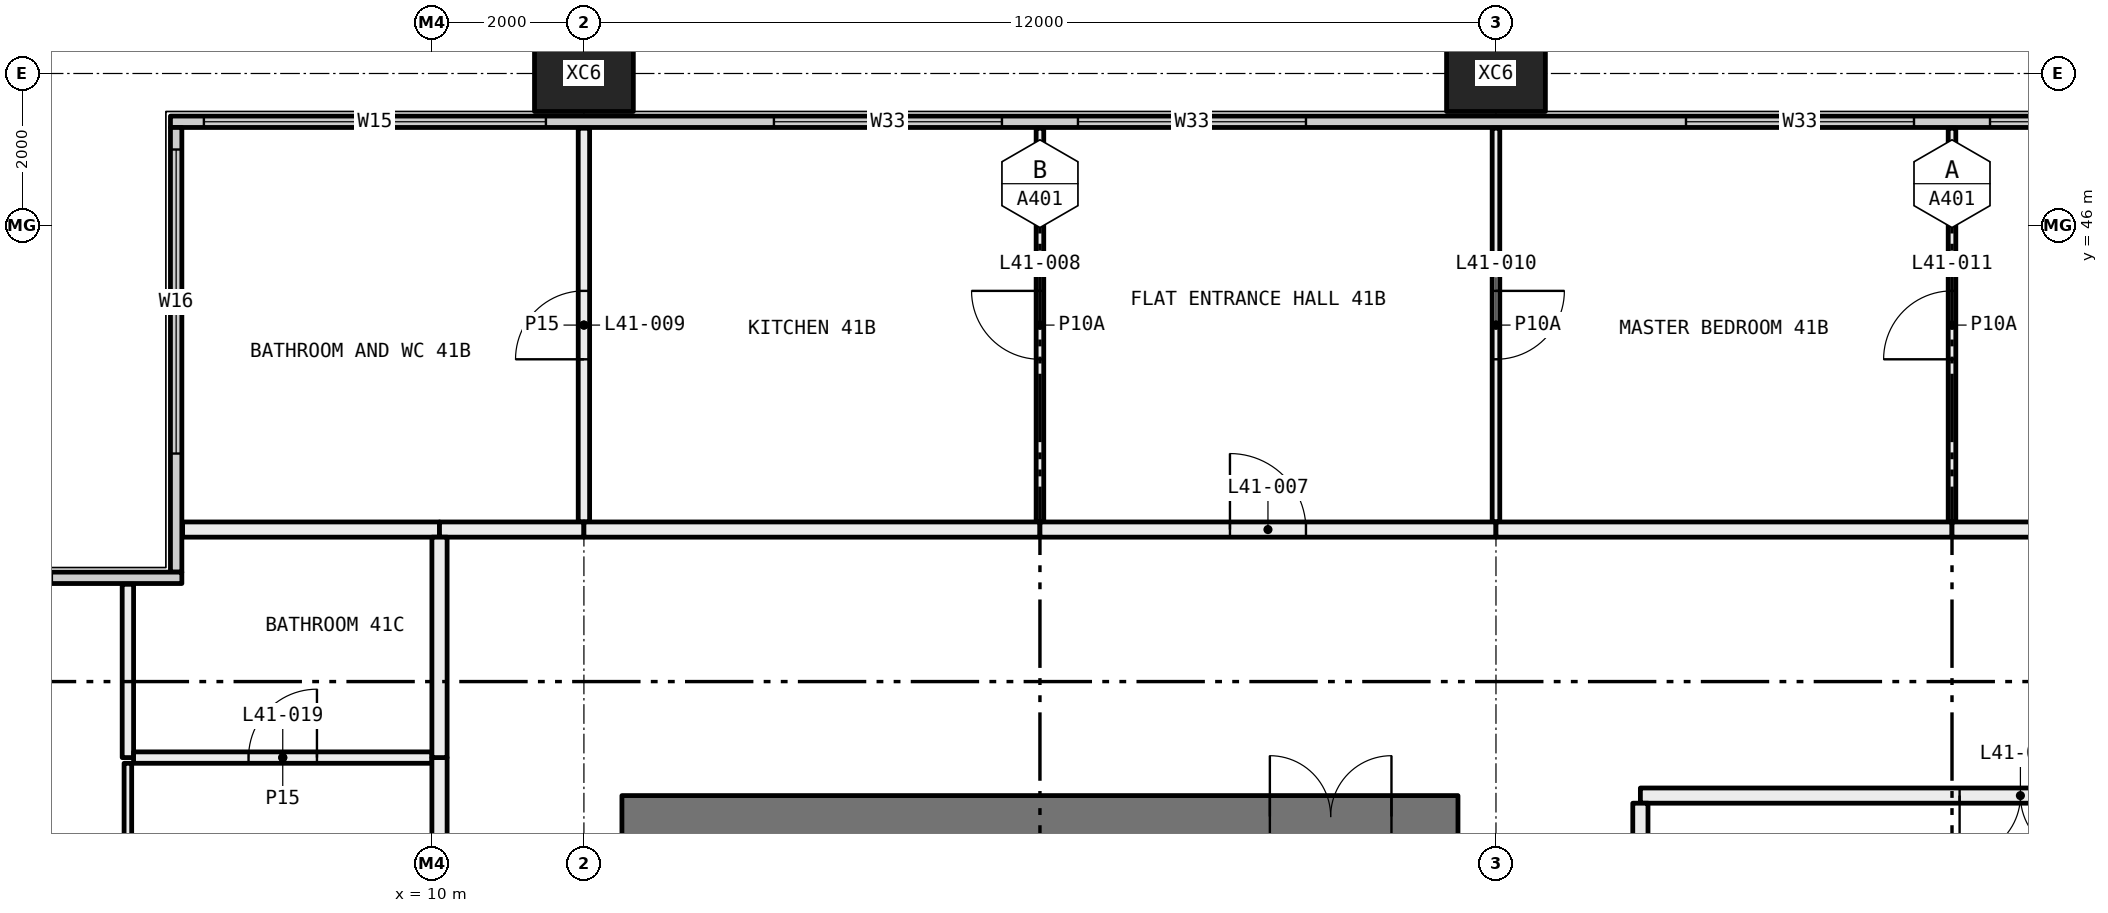
"""IFC4 building model, lengths in metres.
Left out: names, types, materials, properties, quantities, classifications, styles, units other than length and angle.
Written with IfcOpenShell. Run it as: python <this file> out.ifc"""

import sys

from ifc_helpers import new_model, si_unit, direction, frame, frame_2d, origin, origin_2d, place, context, subcontext, project, spatial, rectangle, hollow_rectangle, extrude, element, fill, save


model = new_model("IFC4")
c1 = context("Model", 3, precision=1e-05, world=origin(), true_north=direction((0.0, 1.0)))
c2 = subcontext(c1, "Body", "Model", "MODEL_VIEW")
j1 = project(units=[si_unit("LENGTHUNIT", "METRE"), si_unit("PLANEANGLEUNIT", "RADIAN")], contexts=[c1])
p1 = place(None, origin())
s1 = spatial("IfcSite", under=j1, at=p1, CompositionType="ELEMENT")
p2 = place(p1, origin())
s2 = spatial("IfcBuilding", under=s1, at=p2, CompositionType="ELEMENT")
p3 = place(p2, frame((0.0, 0.0, 158.25)))
s3 = spatial("IfcBuildingStorey", under=s2, at=p3, CompositionType="ELEMENT", Elevation=158.25)
for number, where, z_axis, x_axis in (
    (1, (12.0, 48.0, -0.4), (0.0, 0.0, 1.0), (1.0, 0.0, 0.0)),
    (2, (24.0, 48.0, -0.4), (0.0, 0.0, 1.0), (1.0, 0.0, 0.0)),
):
    element("IfcColumn", number, at=place(p3, frame(where, z_axis=z_axis, x_axis=x_axis)), inside=s3, PredefinedType="COLUMN", context=c2, shape_type="SweptSolid", body=[
        extrude(hollow_rectangle(XDim=1.3, YDim=1.0, WallThickness=0.05, at=origin_2d()), origin(), (0.0, 0.0, 1.0), 3.45),
    ])
p4 = place(p3, frame((6.56, 47.365, 0.0), z_axis=(0.0, 0.0, 1.0), x_axis=(1.0, 0.0, 0.0)))
e3 = element("IfcWall", 3, at=p4, inside=s3, PredefinedType="ELEMENTEDWALL", context=c2, shape_type="SweptSolid", body=[
    extrude(rectangle(XDim=46.88, YDim=0.15, at=frame_2d((23.44, 0.0))), origin(), (0.0, 0.0, 1.0), 3.05),
])
p5 = place(p4, frame((0.44, 0.0, 0.45)))
e4 = element("IfcOpeningElement", 4, at=p5, cuts=e3, PredefinedType="OPENING", context=c2, shape_type="SweptSolid", body=[
    extrude(rectangle(XDim=4.5, YDim=2.55, at=frame_2d((2.25, 1.275))), frame((0.0, 0.085, 0.0), z_axis=(0.0, -1.0, 0.0), x_axis=(1.0, 0.0, 0.0)), (0.0, 0.0, 1.0), 0.17),
])
p6 = place(p4, frame((7.94, 0.0, 0.45)))
e5 = element("IfcOpeningElement", 5, at=p6, cuts=e3, PredefinedType="OPENING", context=c2, shape_type="SweptSolid", body=[
    extrude(rectangle(XDim=3.0, YDim=2.55, at=frame_2d((1.5, 1.275))), frame((0.0, 0.085, 0.0), z_axis=(0.0, -1.0, 0.0), x_axis=(1.0, 0.0, 0.0)), (0.0, 0.0, 1.0), 0.17),
])
p7 = place(p4, frame((11.94, 0.0, 0.45)))
e6 = element("IfcOpeningElement", 6, at=p7, cuts=e3, PredefinedType="OPENING", context=c2, shape_type="SweptSolid", body=[
    extrude(rectangle(XDim=3.0, YDim=2.55, at=frame_2d((1.5, 1.275))), frame((0.0, 0.085, 0.0), z_axis=(0.0, -1.0, 0.0), x_axis=(1.0, 0.0, 0.0)), (0.0, 0.0, 1.0), 0.17),
])
p8 = place(p4, frame((19.94, 0.0, 0.45)))
e7 = element("IfcOpeningElement", 7, at=p8, cuts=e3, PredefinedType="OPENING", context=c2, shape_type="SweptSolid", body=[
    extrude(rectangle(XDim=3.0, YDim=2.55, at=frame_2d((1.5, 1.275))), frame((0.0, 0.085, 0.0), z_axis=(0.0, -1.0, 0.0), x_axis=(1.0, 0.0, 0.0)), (0.0, 0.0, 1.0), 0.17),
])
p9 = place(p4, frame((23.94, 0.0, 0.45)))
e8 = element("IfcOpeningElement", 8, at=p9, cuts=e3, PredefinedType="OPENING", context=c2, shape_type="SweptSolid", body=[
    extrude(rectangle(XDim=2.0, YDim=2.55, at=frame_2d((1.0, 1.275))), frame((0.0, 0.085, 0.0), z_axis=(0.0, -1.0, 0.0), x_axis=(1.0, 0.0, 0.0)), (0.0, 0.0, 1.0), 0.17),
])
p10 = place(p4, frame((31.94, 0.0, 0.45)))
e9 = element("IfcOpeningElement", 9, at=p10, cuts=e3, PredefinedType="OPENING", context=c2, shape_type="SweptSolid", body=[
    extrude(rectangle(XDim=3.0, YDim=2.55, at=frame_2d((1.5, 1.275))), frame((0.0, 0.085, 0.0), z_axis=(0.0, -1.0, 0.0), x_axis=(1.0, 0.0, 0.0)), (0.0, 0.0, 1.0), 0.17),
])
p11 = place(p4, frame((35.94, 0.0, 0.45)))
e10 = element("IfcOpeningElement", 10, at=p11, cuts=e3, PredefinedType="OPENING", context=c2, shape_type="SweptSolid", body=[
    extrude(rectangle(XDim=3.0, YDim=2.55, at=frame_2d((1.5, 1.275))), frame((0.0, 0.085, 0.0), z_axis=(0.0, -1.0, 0.0), x_axis=(1.0, 0.0, 0.0)), (0.0, 0.0, 1.0), 0.17),
])
p12 = place(p4, frame((41.94, 0.0, 0.45)))
e11 = element("IfcOpeningElement", 11, at=p12, cuts=e3, PredefinedType="OPENING", context=c2, shape_type="SweptSolid", body=[
    extrude(rectangle(XDim=4.5, YDim=2.55, at=frame_2d((2.25, 1.275))), frame((0.0, 0.085, 0.0), z_axis=(0.0, -1.0, 0.0), x_axis=(1.0, 0.0, 0.0)), (0.0, 0.0, 1.0), 0.17),
])
p13 = place(p3, frame((6.635, 41.44, 0.0), z_axis=(0.0, 0.0, 1.0), x_axis=(0.0, 1.0, 0.0)))
e12 = element("IfcWall", 12, at=p13, inside=s3, PredefinedType="ELEMENTEDWALL", context=c2, shape_type="SweptSolid", body=[
    extrude(rectangle(XDim=5.85, YDim=0.15, at=frame_2d((2.925, 0.0))), origin(), (0.0, 0.0, 1.0), 3.05),
])
p14 = place(p13, frame((1.56, 0.0, 0.45)))
e13 = element("IfcOpeningElement", 13, at=p14, cuts=e12, PredefinedType="OPENING", context=c2, shape_type="SweptSolid", body=[
    extrude(rectangle(XDim=4.0, YDim=2.55, at=frame_2d((2.0, 1.275))), frame((0.0, 0.085, 0.0), z_axis=(0.0, -1.0, 0.0), x_axis=(1.0, 0.0, 0.0)), (0.0, 0.0, 1.0), 0.17),
])
p15 = place(p3, frame((0.56, 41.365, 0.0), z_axis=(0.0, 0.0, 1.0), x_axis=(1.0, 0.0, 0.0)))
e14 = element("IfcWall", 14, at=p15, inside=s3, PredefinedType="ELEMENTEDWALL", context=c2, shape_type="SweptSolid", body=[
    extrude(rectangle(XDim=6.15, YDim=0.15, at=frame_2d((3.075, 0.0))), origin(), (0.0, 0.0, 1.0), 3.05),
])
p16 = place(p15, frame((0.44, 0.0, 0.45)))
e15 = element("IfcOpeningElement", 15, at=p16, cuts=e14, PredefinedType="OPENING", context=c2, shape_type="SweptSolid", body=[
    extrude(rectangle(XDim=4.0, YDim=2.55, at=frame_2d((2.0, 1.275))), frame((0.0, 0.085, 0.0), z_axis=(0.0, -1.0, 0.0), x_axis=(1.0, 0.0, 0.0)), (0.0, 0.0, 1.0), 0.17),
])
p17 = place(p3, frame((12.0, 42.1, 0.0), z_axis=(0.0, 0.0, 1.0), x_axis=(0.0, 1.0, 0.0)))
e16 = element("IfcWall", 16, at=p17, inside=s3, PredefinedType="PARTITIONING", context=c2, shape_type="SweptSolid", body=[
    extrude(rectangle(XDim=5.18, YDim=0.15, at=frame_2d((2.59, 0.0))), origin(), (0.0, 0.0, 1.0), 3.05),
])
p18 = place(p17, frame((2.14, 0.0, 0.0)))
e17 = element("IfcOpeningElement", 17, at=p18, cuts=e16, PredefinedType="OPENING", context=c2, shape_type="SweptSolid", body=[
    extrude(rectangle(XDim=0.9, YDim=2.1, at=frame_2d((0.45, 1.05))), frame((0.0, 0.085, 0.0), z_axis=(0.0, -1.0, 0.0), x_axis=(1.0, 0.0, 0.0)), (0.0, 0.0, 1.0), 0.17),
])
p19 = place(p3, frame((6.72, 42.0, 0.0), z_axis=(0.0, 0.0, 1.0), x_axis=(1.0, 0.0, 0.0)))
e18 = element("IfcWall", 18, at=p19, inside=s3, PredefinedType="PARTITIONING", context=c2, shape_type="SweptSolid", body=[
    extrude(rectangle(XDim=3.38, YDim=0.2, at=frame_2d((1.69, 0.0))), origin(), (0.0, 0.0, 1.0), 3.05),
])
p20 = place(p3, frame((10.1, 42.0, 0.0), z_axis=(0.0, 0.0, 1.0), x_axis=(1.0, 0.0, 0.0)))
e19 = element("IfcWall", 19, at=p20, inside=s3, PredefinedType="PARTITIONING", context=c2, shape_type="SweptSolid", body=[
    extrude(rectangle(XDim=1.9, YDim=0.2, at=frame_2d((0.95, 0.0))), origin(), (0.0, 0.0, 1.0), 3.05),
])
p21 = place(p3, frame((18.0, 42.1, 0.0), z_axis=(0.0, 0.0, 1.0), x_axis=(0.0, 1.0, 0.0)))
e20 = element("IfcWall", 20, at=p21, inside=s3, PredefinedType="PARTITIONING", context=c2, shape_type="SweptSolid", body=[
    extrude(rectangle(XDim=5.18, YDim=0.1, at=frame_2d((2.59, 0.0))), origin(), (0.0, 0.0, 1.0), 3.05),
])
p22 = place(p21, frame((2.14, 0.0, 0.0)))
e21 = element("IfcOpeningElement", 21, at=p22, cuts=e20, PredefinedType="OPENING", context=c2, shape_type="SweptSolid", body=[
    extrude(rectangle(XDim=0.9, YDim=2.1, at=frame_2d((0.45, 1.05))), frame((0.0, 0.06, 0.0), z_axis=(0.0, -1.0, 0.0), x_axis=(1.0, 0.0, 0.0)), (0.0, 0.0, 1.0), 0.12),
])
p23 = place(p3, frame((12.0, 42.0, 0.0), z_axis=(0.0, 0.0, 1.0), x_axis=(1.0, 0.0, 0.0)))
e22 = element("IfcWall", 22, at=p23, inside=s3, PredefinedType="PARTITIONING", context=c2, shape_type="SweptSolid", body=[
    extrude(rectangle(XDim=6.0, YDim=0.2, at=frame_2d((3.0, 0.0))), origin(), (0.0, 0.0, 1.0), 3.05),
])
p24 = place(p3, frame((24.0, 42.1, 0.0), z_axis=(0.0, 0.0, 1.0), x_axis=(0.0, 1.0, 0.0)))
e23 = element("IfcWall", 23, at=p24, inside=s3, PredefinedType="PARTITIONING", context=c2, shape_type="SweptSolid", body=[
    extrude(rectangle(XDim=5.18, YDim=0.1, at=frame_2d((2.59, 0.0))), origin(), (0.0, 0.0, 1.0), 3.05),
])
p25 = place(p24, frame((2.14, 0.0, 0.0)))
e24 = element("IfcOpeningElement", 24, at=p25, cuts=e23, PredefinedType="OPENING", context=c2, shape_type="SweptSolid", body=[
    extrude(rectangle(XDim=0.9, YDim=2.1, at=frame_2d((0.45, 1.05))), frame((0.0, 0.06, 0.0), z_axis=(0.0, -1.0, 0.0), x_axis=(1.0, 0.0, 0.0)), (0.0, 0.0, 1.0), 0.12),
])
p26 = place(p3, frame((18.0, 42.0, 0.0), z_axis=(0.0, 0.0, 1.0), x_axis=(1.0, 0.0, 0.0)))
e25 = element("IfcWall", 25, at=p26, inside=s3, PredefinedType="PARTITIONING", context=c2, shape_type="SweptSolid", body=[
    extrude(rectangle(XDim=6.0, YDim=0.2, at=frame_2d((3.0, 0.0))), origin(), (0.0, 0.0, 1.0), 3.05),
])
p27 = place(p26, frame((2.5, 0.0, 0.0)))
e26 = element("IfcOpeningElement", 26, at=p27, cuts=e25, PredefinedType="OPENING", context=c2, shape_type="SweptSolid", body=[
    extrude(rectangle(XDim=1.0, YDim=2.1, at=frame_2d((0.5, 1.05))), frame((0.0, 0.11, 0.0), z_axis=(0.0, -1.0, 0.0), x_axis=(1.0, 0.0, 0.0)), (0.0, 0.0, 1.0), 0.22),
])
p28 = place(p3, frame((30.0, 42.1, 0.0), z_axis=(0.0, 0.0, 1.0), x_axis=(0.0, 1.0, 0.0)))
e27 = element("IfcWall", 27, at=p28, inside=s3, PredefinedType="PARTITIONING", context=c2, shape_type="SweptSolid", body=[
    extrude(rectangle(XDim=5.18, YDim=0.1, at=frame_2d((2.59, 0.0))), origin(), (0.0, 0.0, 1.0), 3.05),
])
p29 = place(p28, frame((2.14, 0.0, 0.0)))
e28 = element("IfcOpeningElement", 28, at=p29, cuts=e27, PredefinedType="OPENING", context=c2, shape_type="SweptSolid", body=[
    extrude(rectangle(XDim=0.9, YDim=2.1, at=frame_2d((0.45, 1.05))), frame((0.0, 0.06, 0.0), z_axis=(0.0, -1.0, 0.0), x_axis=(1.0, 0.0, 0.0)), (0.0, 0.0, 1.0), 0.12),
])
p30 = place(p3, frame((24.0, 42.0, 0.0), z_axis=(0.0, 0.0, 1.0), x_axis=(1.0, 0.0, 0.0)))
e29 = element("IfcWall", 29, at=p30, inside=s3, PredefinedType="PARTITIONING", context=c2, shape_type="SweptSolid", body=[
    extrude(rectangle(XDim=6.0, YDim=0.2, at=frame_2d((3.0, 0.0))), origin(), (0.0, 0.0, 1.0), 3.05),
])
p31 = place(p3, frame((30.0, 42.0, 0.0), z_axis=(0.0, 0.0, 1.0), x_axis=(1.0, 0.0, 0.0)))
e30 = element("IfcWall", 30, at=p31, inside=s3, PredefinedType="PARTITIONING", context=c2, shape_type="SweptSolid", body=[
    extrude(rectangle(XDim=5.9, YDim=0.2, at=frame_2d((2.95, 0.0))), origin(), (0.0, 0.0, 1.0), 3.05),
])
p32 = place(p3, frame((6.0, 36.1, 0.0), z_axis=(0.0, 0.0, 1.0), x_axis=(0.0, 1.0, 0.0)))
e31 = element("IfcWall", 31, at=p32, inside=s3, PredefinedType="PARTITIONING", context=c2, shape_type="SweptSolid", body=[
    extrude(rectangle(XDim=2.825, YDim=0.1, at=frame_2d((1.413, 0.0))), origin(), (0.0, 0.0, 1.0), 3.05),
])
p33 = place(p3, frame((6.0, 39.0, 0.0), z_axis=(0.0, 0.0, 1.0), x_axis=(0.0, 1.0, 0.0)))
e32 = element("IfcWall", 32, at=p33, inside=s3, PredefinedType="PARTITIONING", context=c2, shape_type="SweptSolid", body=[
    extrude(rectangle(XDim=2.28, YDim=0.15, at=frame_2d((1.14, 0.0))), origin(), (0.0, 0.0, 1.0), 3.05),
])
p34 = place(p3, frame((10.0, 39.0, 0.0), z_axis=(0.0, 0.0, 1.0), x_axis=(-1.0, 0.0, 0.0)))
e33 = element("IfcWall", 33, at=p34, inside=s3, PredefinedType="PARTITIONING", context=c2, shape_type="SweptSolid", body=[
    extrude(rectangle(XDim=3.925, YDim=0.15, at=frame_2d((1.962, 0.0))), origin(), (0.0, 0.0, 1.0), 3.05),
])
p35 = place(p34, frame((1.512, 0.0, 0.0)))
e34 = element("IfcOpeningElement", 34, at=p35, cuts=e33, PredefinedType="OPENING", context=c2, shape_type="SweptSolid", body=[
    extrude(rectangle(XDim=0.9, YDim=2.1, at=frame_2d((0.45, 1.05))), frame((0.0, 0.085, 0.0), z_axis=(0.0, -1.0, 0.0), x_axis=(1.0, 0.0, 0.0)), (0.0, 0.0, 1.0), 0.17),
])
for number, where, z_axis, x_axis in (
    (35, (10.1, 36.1, 0.0), (0.0, 0.0, 1.0), (0.0, 1.0, 0.0)),
    (36, (10.1, 39.0, 0.0), (0.0, 0.0, 1.0), (0.0, 1.0, 0.0)),
):
    element("IfcWall", number, at=place(p3, frame(where, z_axis=z_axis, x_axis=x_axis)), inside=s3, PredefinedType="PARTITIONING", context=c2, shape_type="SweptSolid", body=[
        extrude(rectangle(XDim=2.9, YDim=0.2, at=frame_2d((1.45, 0.0))), origin(), (0.0, 0.0, 1.0), 3.05),
    ])
p36 = place(p3, frame((35.9, 38.5, 0.0), z_axis=(0.0, 0.0, 1.0), x_axis=(-1.0, 0.0, 0.0)))
e37 = element("IfcWall", 37, at=p36, inside=s3, PredefinedType="PARTITIONING", context=c2, shape_type="SweptSolid", body=[
    extrude(rectangle(XDim=10.0, YDim=0.2, at=frame_2d((5.0, 0.0))), origin(), (0.0, 0.0, 1.0), 3.05),
])
p37 = place(p36, frame((4.2, 0.0, 0.0)))
e38 = element("IfcOpeningElement", 38, at=p37, cuts=e37, PredefinedType="OPENING", context=c2, shape_type="SweptSolid", body=[
    extrude(rectangle(XDim=1.6, YDim=2.1, at=frame_2d((0.8, 1.05))), frame((0.0, 0.11, 0.0), z_axis=(0.0, -1.0, 0.0), x_axis=(1.0, 0.0, 0.0)), (0.0, 0.0, 1.0), 0.22),
])
p38 = place(p3, frame((25.9, 38.4, 0.0), z_axis=(0.0, 0.0, 1.0), x_axis=(0.0, -1.0, 0.0)))
e39 = element("IfcWall", 39, at=p38, inside=s3, PredefinedType="PARTITIONING", context=c2, shape_type="SweptSolid", body=[
    extrude(rectangle(XDim=2.5, YDim=0.2, at=frame_2d((1.25, 0.0))), origin(), (0.0, 0.0, 1.0), 2.45),
])
p39 = place(p3, frame((12.5, 38.225, 0.0), z_axis=(0.0, 0.0, 1.0), x_axis=(1.0, 0.0, 0.0)))
e40 = element("IfcWall", 40, at=p39, inside=s3, PredefinedType="SHEAR", context=c2, shape_type="SweptSolid", body=[
    extrude(rectangle(XDim=11.0, YDim=0.55, at=frame_2d((5.5, 0.0))), origin(), (0.0, 0.0, 1.0), 3.05),
])
p40 = place(p39, frame((8.525, 0.0, 0.0)))
e41 = element("IfcOpeningElement", 41, at=p40, cuts=e40, PredefinedType="OPENING", context=c2, shape_type="SweptSolid", body=[
    extrude(rectangle(XDim=1.6, YDim=2.1, at=frame_2d((0.8, 1.05))), frame((0.0, 0.285, 0.0), z_axis=(0.0, -1.0, 0.0), x_axis=(1.0, 0.0, 0.0)), (0.0, 0.0, 1.0), 0.57),
])
p41 = place(p5, origin())
e42 = element("IfcWindow", 42, at=p41, inside=s3, PartitioningType="SINGLE_PANEL", PredefinedType="WINDOW", context=c2, shape_type="SweptSolid", body=[
    extrude(rectangle(XDim=4.5, YDim=2.55, at=frame_2d((2.25, 1.275))), frame((0.0, 0.03, 0.0), z_axis=(0.0, -1.0, 0.0), x_axis=(1.0, 0.0, 0.0)), (0.0, 0.0, 1.0), 0.06),
])
fill(e4, e42)
p42 = place(p6, origin())
e43 = element("IfcWindow", 43, at=p42, inside=s3, PartitioningType="SINGLE_PANEL", PredefinedType="WINDOW", context=c2, shape_type="SweptSolid", body=[
    extrude(rectangle(XDim=3.0, YDim=2.55, at=frame_2d((1.5, 1.275))), frame((0.0, 0.03, 0.0), z_axis=(0.0, -1.0, 0.0), x_axis=(1.0, 0.0, 0.0)), (0.0, 0.0, 1.0), 0.06),
])
fill(e5, e43)
p43 = place(p7, origin())
e44 = element("IfcWindow", 44, at=p43, inside=s3, PartitioningType="SINGLE_PANEL", PredefinedType="WINDOW", context=c2, shape_type="SweptSolid", body=[
    extrude(rectangle(XDim=3.0, YDim=2.55, at=frame_2d((1.5, 1.275))), frame((0.0, 0.03, 0.0), z_axis=(0.0, -1.0, 0.0), x_axis=(1.0, 0.0, 0.0)), (0.0, 0.0, 1.0), 0.06),
])
fill(e6, e44)
p44 = place(p8, origin())
e45 = element("IfcWindow", 45, at=p44, inside=s3, PartitioningType="SINGLE_PANEL", PredefinedType="WINDOW", context=c2, shape_type="SweptSolid", body=[
    extrude(rectangle(XDim=3.0, YDim=2.55, at=frame_2d((1.5, 1.275))), frame((0.0, 0.03, 0.0), z_axis=(0.0, -1.0, 0.0), x_axis=(1.0, 0.0, 0.0)), (0.0, 0.0, 1.0), 0.06),
])
fill(e7, e45)
p45 = place(p9, origin())
e46 = element("IfcWindow", 46, at=p45, inside=s3, PartitioningType="SINGLE_PANEL", PredefinedType="WINDOW", context=c2, shape_type="SweptSolid", body=[
    extrude(rectangle(XDim=2.0, YDim=2.55, at=frame_2d((1.0, 1.275))), frame((0.0, 0.03, 0.0), z_axis=(0.0, -1.0, 0.0), x_axis=(1.0, 0.0, 0.0)), (0.0, 0.0, 1.0), 0.06),
])
fill(e8, e46)
p46 = place(p14, origin())
e47 = element("IfcWindow", 47, at=p46, inside=s3, PartitioningType="SINGLE_PANEL", PredefinedType="WINDOW", context=c2, shape_type="SweptSolid", body=[
    extrude(rectangle(XDim=4.0, YDim=2.55, at=frame_2d((2.0, 1.275))), frame((0.0, 0.03, 0.0), z_axis=(0.0, -1.0, 0.0), x_axis=(1.0, 0.0, 0.0)), (0.0, 0.0, 1.0), 0.06),
])
fill(e13, e47)
p47 = place(p27, origin())
e48 = element("IfcDoor", 48, at=p47, inside=s3, OperationType="SINGLE_SWING_RIGHT", PredefinedType="DOOR", context=c2, shape_type="SweptSolid", body=[
    extrude(rectangle(XDim=1.0, YDim=2.1, at=frame_2d((0.5, 1.05))), frame((0.0, 0.025, 0.0), z_axis=(0.0, -1.0, 0.0), x_axis=(1.0, 0.0, 0.0)), (0.0, 0.0, 1.0), 0.05),
])
fill(e26, e48)
p48 = place(p22, origin())
e49 = element("IfcDoor", 49, at=p48, inside=s3, OperationType="SINGLE_SWING_LEFT", PredefinedType="DOOR", context=c2, shape_type="SweptSolid", body=[
    extrude(rectangle(XDim=0.9, YDim=2.1, at=frame_2d((0.45, 1.05))), frame((0.0, 0.025, 0.0), z_axis=(0.0, -1.0, 0.0), x_axis=(1.0, 0.0, 0.0)), (0.0, 0.0, 1.0), 0.05),
])
fill(e21, e49)
p49 = place(p18, origin())
e50 = element("IfcDoor", 50, at=p49, inside=s3, OperationType="SINGLE_SWING_RIGHT", PredefinedType="DOOR", context=c2, shape_type="SweptSolid", body=[
    extrude(rectangle(XDim=0.9, YDim=2.1, at=frame_2d((0.45, 1.05))), frame((0.0, 0.025, 0.0), z_axis=(0.0, -1.0, 0.0), x_axis=(1.0, 0.0, 0.0)), (0.0, 0.0, 1.0), 0.05),
])
fill(e17, e50)
p50 = place(p25, frame((0.9, 0.0, 0.0), x_axis=(-1.0, 0.0, 0.0)))
e51 = element("IfcDoor", 51, at=p50, inside=s3, OperationType="SINGLE_SWING_RIGHT", PredefinedType="DOOR", context=c2, shape_type="SweptSolid", body=[
    extrude(rectangle(XDim=0.9, YDim=2.1, at=frame_2d((0.45, 1.05))), frame((0.0, 0.025, 0.0), z_axis=(0.0, -1.0, 0.0), x_axis=(1.0, 0.0, 0.0)), (0.0, 0.0, 1.0), 0.05),
])
fill(e24, e51)
p51 = place(p29, origin())
e52 = element("IfcDoor", 52, at=p51, inside=s3, OperationType="SINGLE_SWING_RIGHT", PredefinedType="DOOR", context=c2, shape_type="SweptSolid", body=[
    extrude(rectangle(XDim=0.9, YDim=2.1, at=frame_2d((0.45, 1.05))), frame((0.0, 0.025, 0.0), z_axis=(0.0, -1.0, 0.0), x_axis=(1.0, 0.0, 0.0)), (0.0, 0.0, 1.0), 0.05),
])
fill(e28, e52)
p52 = place(p35, frame((0.9, 0.0, 0.0), x_axis=(-1.0, 0.0, 0.0)))
e53 = element("IfcDoor", 53, at=p52, inside=s3, OperationType="SINGLE_SWING_LEFT", PredefinedType="DOOR", context=c2, shape_type="SweptSolid", body=[
    extrude(rectangle(XDim=0.9, YDim=2.1, at=frame_2d((0.45, 1.05))), frame((0.0, 0.025, 0.0), z_axis=(0.0, -1.0, 0.0), x_axis=(1.0, 0.0, 0.0)), (0.0, 0.0, 1.0), 0.05),
])
fill(e34, e53)
p53 = place(p37, origin())
e54 = element("IfcDoor", 54, at=p53, inside=s3, OperationType="DOUBLE_DOOR_SINGLE_SWING", PredefinedType="DOOR", context=c2, shape_type="SweptSolid", body=[
    extrude(rectangle(XDim=1.6, YDim=2.1, at=frame_2d((0.8, 1.05))), frame((0.0, 0.025, 0.0), z_axis=(0.0, -1.0, 0.0), x_axis=(1.0, 0.0, 0.0)), (0.0, 0.0, 1.0), 0.05),
])
fill(e38, e54)
p54 = place(p40, origin())
e55 = element("IfcDoor", 55, at=p54, inside=s3, OperationType="DOUBLE_DOOR_SINGLE_SWING", PredefinedType="DOOR", context=c2, shape_type="SweptSolid", body=[
    extrude(rectangle(XDim=1.6, YDim=2.1, at=frame_2d((0.8, 1.05))), frame((0.0, 0.025, 0.0), z_axis=(0.0, -1.0, 0.0), x_axis=(1.0, 0.0, 0.0)), (0.0, 0.0, 1.0), 0.05),
])
fill(e41, e55)
save(model, sys.argv[1])
